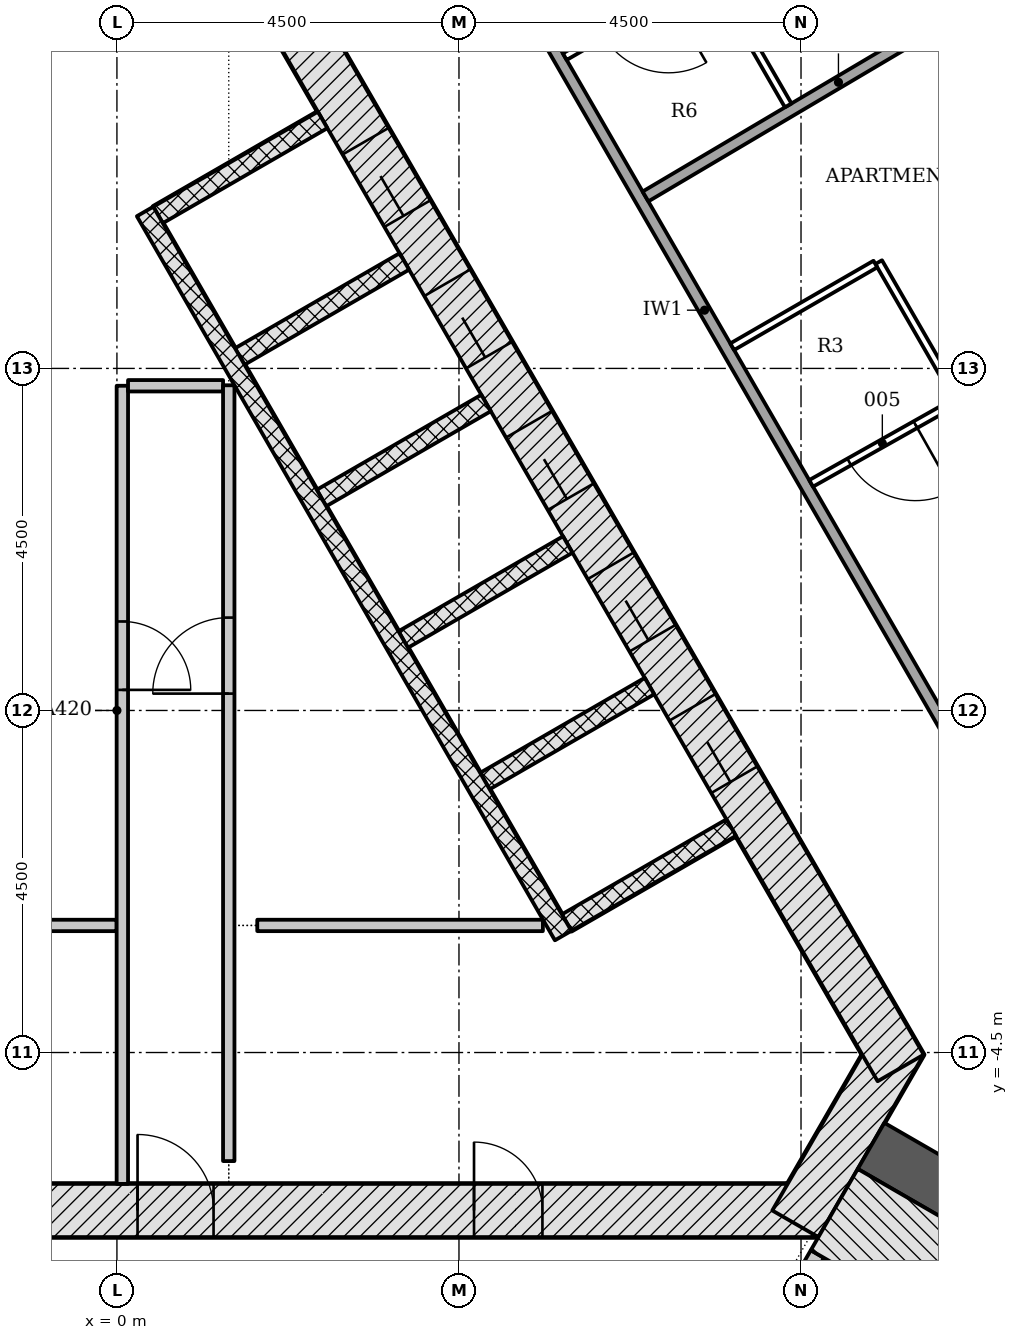
"""IFC4 building model, lengths in metres.
Left out: names, types, materials, properties, quantities, classifications, styles, units other than length and angle.
Written with IfcOpenShell. Run it as: python <this file> out.ifc"""

import sys

from ifc_helpers import new_model, si_unit, direction, frame, frame_2d, origin, place, context, subcontext, project, spatial, rectangle, extrude, element, fill, save


model = new_model("IFC4")
c1 = context("Model", 3, precision=1e-05, world=origin(), true_north=direction((0.0, 1.0)))
c2 = subcontext(c1, "Body", "Model", "MODEL_VIEW")
j1 = project(units=[si_unit("LENGTHUNIT", "METRE"), si_unit("PLANEANGLEUNIT", "RADIAN")], contexts=[c1])
p1 = place(None, origin())
s1 = spatial("IfcSite", under=j1, at=p1, CompositionType="ELEMENT")
p2 = place(p1, origin())
s2 = spatial("IfcBuilding", under=s1, at=p2, CompositionType="ELEMENT")
p3 = place(p2, frame((0.0, 0.0, 188.7)))
s3 = spatial("IfcBuildingStorey", under=s2, at=p3, CompositionType="ELEMENT", Elevation=188.7)
p4 = place(p3, frame((-9.229, -6.578, -0.2), z_axis=(0.0, 0.0, 1.0), x_axis=(1.0, 0.0, 0.0)))
e1 = element("IfcWall", 1, at=p4, inside=s3, PredefinedType="SHEAR", context=c2, shape_type="SweptSolid", body=[
    extrude(rectangle(XDim=18.458, YDim=0.7, at=frame_2d((9.229, 0.0))), origin(), (0.0, 0.0, 1.0), 3.6),
])
p5 = place(p4, frame((9.5, 0.0, 0.2)))
e2 = element("IfcOpeningElement", 2, at=p5, cuts=e1, PredefinedType="OPENING", context=c2, shape_type="SweptSolid", body=[
    extrude(rectangle(XDim=1.0, YDim=2.1, at=frame_2d((0.5, 1.05))), frame((0.0, 0.36, 0.0), z_axis=(0.0, -1.0, 0.0), x_axis=(1.0, 0.0, 0.0)), (0.0, 0.0, 1.0), 0.72),
])
p6 = place(p4, frame((4.402, 0.0, 0.2)))
e3 = element("IfcOpeningElement", 3, at=p6, cuts=e1, PredefinedType="OPENING", context=c2, shape_type="SweptSolid", body=[
    extrude(rectangle(XDim=0.9, YDim=2.1, at=frame_2d((0.45, 1.05))), frame((0.0, 0.36, 0.0), z_axis=(0.0, -1.0, 0.0), x_axis=(1.0, 0.0, 0.0)), (0.0, 0.0, 1.0), 0.72),
])
p7 = place(p4, frame((13.927, 0.0, 0.2)))
e4 = element("IfcOpeningElement", 4, at=p7, cuts=e1, PredefinedType="OPENING", context=c2, shape_type="SweptSolid", body=[
    extrude(rectangle(XDim=0.9, YDim=2.1, at=frame_2d((0.45, 1.05))), frame((0.0, 0.36, 0.0), z_axis=(0.0, -1.0, 0.0), x_axis=(1.0, 0.0, 0.0)), (0.0, 0.0, 1.0), 0.72),
])
p8 = place(p3, frame((8.926, -6.753, -0.2), z_axis=(0.0, 0.0, 1.0), x_axis=(0.500042739161, 0.866000726912, 0.0)))
e5 = element("IfcWall", 5, at=p8, inside=s3, PredefinedType="SHEAR", context=c2, shape_type="SweptSolid", body=[
    extrude(rectangle(XDim=2.771, YDim=0.7, at=frame_2d((1.386, 0.0))), origin(), (0.0, 0.0, 1.0), 3.6),
])
p9 = place(p3, frame((10.311, -4.703, -0.2), z_axis=(0.0, 0.0, 1.0), x_axis=(-0.500001446645, 0.866024568562, 0.0)))
e6 = element("IfcWall", 6, at=p9, inside=s3, PredefinedType="SHEAR", context=c2, shape_type="SweptSolid", body=[
    extrude(rectangle(XDim=18.458, YDim=0.7, at=frame_2d((9.229, 0.0))), origin(), (0.0, 0.0, 1.0), 3.6),
])
p10 = place(p9, frame((4.379, 0.0, 0.2)))
e7 = element("IfcOpeningElement", 7, at=p10, cuts=e6, PredefinedType="OPENING", context=c2, shape_type="SweptSolid", body=[
    extrude(rectangle(XDim=1.1, YDim=2.1, at=frame_2d((0.55, 1.05))), frame((0.0, 0.36, 0.0), z_axis=(0.0, -1.0, 0.0), x_axis=(1.0, 0.0, 0.0)), (0.0, 0.0, 1.0), 0.72),
])
p11 = place(p9, frame((6.529, 0.0, 0.2)))
e8 = element("IfcOpeningElement", 8, at=p11, cuts=e6, PredefinedType="OPENING", context=c2, shape_type="SweptSolid", body=[
    extrude(rectangle(XDim=1.1, YDim=2.1, at=frame_2d((0.55, 1.05))), frame((0.0, 0.36, 0.0), z_axis=(0.0, -1.0, 0.0), x_axis=(1.0, 0.0, 0.0)), (0.0, 0.0, 1.0), 0.72),
])
p12 = place(p9, frame((8.679, 0.0, 0.2)))
e9 = element("IfcOpeningElement", 9, at=p12, cuts=e6, PredefinedType="OPENING", context=c2, shape_type="SweptSolid", body=[
    extrude(rectangle(XDim=1.1, YDim=2.1, at=frame_2d((0.55, 1.05))), frame((0.0, 0.36, 0.0), z_axis=(0.0, -1.0, 0.0), x_axis=(1.0, 0.0, 0.0)), (0.0, 0.0, 1.0), 0.72),
])
p13 = place(p9, frame((10.829, 0.0, 0.2)))
e10 = element("IfcOpeningElement", 10, at=p13, cuts=e6, PredefinedType="OPENING", context=c2, shape_type="SweptSolid", body=[
    extrude(rectangle(XDim=1.1, YDim=2.1, at=frame_2d((0.55, 1.05))), frame((0.0, 0.36, 0.0), z_axis=(0.0, -1.0, 0.0), x_axis=(1.0, 0.0, 0.0)), (0.0, 0.0, 1.0), 0.72),
])
p14 = place(p9, frame((12.979, 0.0, 0.2)))
e11 = element("IfcOpeningElement", 11, at=p14, cuts=e6, PredefinedType="OPENING", context=c2, shape_type="SweptSolid", body=[
    extrude(rectangle(XDim=1.1, YDim=2.1, at=frame_2d((0.55, 1.05))), frame((0.0, 0.36, 0.0), z_axis=(0.0, -1.0, 0.0), x_axis=(1.0, 0.0, 0.0)), (0.0, 0.0, 1.0), 0.72),
])
p15 = place(p3, frame((-1.083, 11.281, -0.2), z_axis=(0.0, 0.0, 1.0), x_axis=(-0.500001446645, -0.866024568562, 0.0)))
e12 = element("IfcWall", 12, at=p15, inside=s3, PredefinedType="SHEAR", context=c2, shape_type="SweptSolid", body=[
    extrude(rectangle(XDim=18.458, YDim=0.7, at=frame_2d((9.229, 0.0))), origin(), (0.0, 0.0, 1.0), 3.6),
])
p16 = place(p15, frame((8.979, 0.0, 0.2)))
e13 = element("IfcOpeningElement", 13, at=p16, cuts=e12, PredefinedType="OPENING", context=c2, shape_type="SweptSolid", body=[
    extrude(rectangle(XDim=1.2, YDim=2.1, at=frame_2d((0.6, 1.05))), frame((0.0, 0.36, 0.0), z_axis=(0.0, -1.0, 0.0), x_axis=(1.0, 0.0, 0.0)), (0.0, 0.0, 1.0), 0.72),
])
p17 = place(p15, frame((11.029, 0.0, 0.2)))
e14 = element("IfcOpeningElement", 14, at=p17, cuts=e12, PredefinedType="OPENING", context=c2, shape_type="SweptSolid", body=[
    extrude(rectangle(XDim=1.2, YDim=2.1, at=frame_2d((0.6, 1.05))), frame((0.0, 0.36, 0.0), z_axis=(0.0, -1.0, 0.0), x_axis=(1.0, 0.0, 0.0)), (0.0, 0.0, 1.0), 0.72),
])
p18 = place(p3, frame((9.922, -5.728, -0.2), z_axis=(0.0, 0.0, 1.0), x_axis=(0.866025463095, -0.499999897272, 0.0)))
e15 = element("IfcWall", 15, at=p18, inside=s3, PredefinedType="SHEAR", context=c2, shape_type="SweptSolid", body=[
    extrude(rectangle(XDim=9.521, YDim=0.7, at=frame_2d((4.761, 0.0))), origin(), (0.0, 0.0, 1.0), 3.6),
])
for number, where, z_axis, x_axis in (
    (16, (8.081, -1.541, -0.2), (0.0, 0.0, 1.0), (-0.866, -0.5, 0.0)),
    (17, (7.006, 0.321, -0.2), (0.0, 0.0, 1.0), (-0.866, -0.5, 0.0)),
):
    element("IfcWall", number, at=place(p3, frame(where, z_axis=z_axis, x_axis=x_axis)), inside=s3, PredefinedType="PARTITIONING", context=c2, shape_type="SweptSolid", body=[
        extrude(rectangle(XDim=2.5, YDim=0.25, at=frame_2d((1.25, 0.0))), origin(), (0.0, 0.0, 1.0), 3.6),
    ])
p19 = place(p3, frame((5.931, 2.183, -0.2), z_axis=(0.0, 0.0, 1.0), x_axis=(-0.866047370643, -0.499961950354, 0.0)))
e18 = element("IfcWall", 18, at=p19, inside=s3, PredefinedType="PARTITIONING", context=c2, shape_type="SweptSolid", body=[
    extrude(rectangle(XDim=2.5, YDim=0.25, at=frame_2d((1.25, 0.0))), origin(), (0.0, 0.0, 1.0), 3.6),
])
for number, where, z_axis, x_axis in (
    (19, (4.856, 4.045, -0.2), (0.0, 0.0, 1.0), (-0.866, -0.5, 0.0)),
    (20, (3.781, 5.907, -0.2), (0.0, 0.0, 1.0), (-0.866, -0.5, 0.0)),
    (21, (2.706, 7.769, -0.2), (0.0, 0.0, 1.0), (-0.866, -0.5, 0.0)),
):
    element("IfcWall", number, at=place(p3, frame(where, z_axis=z_axis, x_axis=x_axis)), inside=s3, PredefinedType="PARTITIONING", context=c2, shape_type="SweptSolid", body=[
        extrude(rectangle(XDim=2.5, YDim=0.25, at=frame_2d((1.25, 0.0))), origin(), (0.0, 0.0, 1.0), 3.6),
    ])
p20 = place(p3, frame((5.87, -2.961, 0.0), z_axis=(0.0, 0.0, 1.0), x_axis=(-0.50000615651, 0.866021849293, 0.0)))
e22 = element("IfcWall", 22, at=p20, inside=s3, PredefinedType="PARTITIONING", context=c2, shape_type="SweptSolid", body=[
    extrude(rectangle(XDim=11.0, YDim=0.25, at=frame_2d((5.5, 0.0))), origin(), (0.0, 0.0, 1.0), 3.4),
])
p21 = place(p3, frame((-5.142, -2.828, 0.0), z_axis=(0.0, 0.0, 1.0), x_axis=(1.0, 0.0, 0.0)))
e23 = element("IfcWall", 23, at=p21, inside=s3, PredefinedType="PARTITIONING", context=c2, shape_type="SweptSolid", body=[
    extrude(rectangle(XDim=5.139, YDim=0.15, at=frame_2d((2.569, 0.0))), origin(), (0.0, 0.0, 1.0), 3.4),
])
p22 = place(p3, frame((0.071, 4.272, 0.0), z_axis=(0.0, 0.0, 1.0), x_axis=(0.0, -1.0, 0.0)))
e24 = element("IfcWall", 24, at=p22, inside=s3, PredefinedType="PARTITIONING", context=c2, shape_type="SweptSolid", body=[
    extrude(rectangle(XDim=10.5, YDim=0.15, at=frame_2d((5.25, 0.0))), origin(), (0.0, 0.0, 1.0), 3.4),
])
p23 = place(p22, frame((3.101, 0.0, 0.0)))
e25 = element("IfcOpeningElement", 25, at=p23, cuts=e24, PredefinedType="OPENING", context=c2, shape_type="SweptSolid", body=[
    extrude(rectangle(XDim=0.9, YDim=2.1, at=frame_2d((0.45, 1.05))), frame((0.0, 0.085, 0.0), z_axis=(0.0, -1.0, 0.0), x_axis=(1.0, 0.0, 0.0)), (0.0, 0.0, 1.0), 0.17),
])
p24 = place(p3, frame((0.146, 4.272, 0.0), z_axis=(0.0, 0.0, 1.0), x_axis=(1.0, 0.0, 0.0)))
e26 = element("IfcWall", 26, at=p24, inside=s3, PredefinedType="PARTITIONING", context=c2, shape_type="SweptSolid", body=[
    extrude(rectangle(XDim=1.25, YDim=0.15, at=frame_2d((0.625, 0.0))), origin(), (0.0, 0.0, 1.0), 3.4),
])
p25 = place(p3, frame((1.471, -5.928, 0.0), z_axis=(0.0, 0.0, 1.0), x_axis=(0.0, 1.0, 0.0)))
e27 = element("IfcWall", 27, at=p25, inside=s3, PredefinedType="PARTITIONING", context=c2, shape_type="SweptSolid", body=[
    extrude(rectangle(XDim=10.206, YDim=0.15, at=frame_2d((5.103, 0.0))), origin(), (0.0, 0.0, 1.0), 3.4),
])
p26 = place(p25, frame((6.15, 0.0, 0.0)))
e28 = element("IfcOpeningElement", 28, at=p26, cuts=e27, PredefinedType="OPENING", context=c2, shape_type="SweptSolid", body=[
    extrude(rectangle(XDim=1.0, YDim=2.1, at=frame_2d((0.5, 1.05))), frame((0.0, 0.085, 0.0), z_axis=(0.0, -1.0, 0.0), x_axis=(1.0, 0.0, 0.0)), (0.0, 0.0, 1.0), 0.17),
])
p27 = place(p3, frame((1.846, -2.828, 0.0), z_axis=(0.0, 0.0, 1.0), x_axis=(1.0, 0.0, 0.0)))
e29 = element("IfcWall", 29, at=p27, inside=s3, PredefinedType="PARTITIONING", context=c2, shape_type="SweptSolid", body=[
    extrude(rectangle(XDim=3.758, YDim=0.15, at=frame_2d((1.879, 0.0))), origin(), (0.0, 0.0, 1.0), 3.4),
])
p28 = place(p3, frame((7.44, -10.226, -0.2), z_axis=(0.0, 0.0, 1.0), x_axis=(0.500022077904, 0.866012656725, 0.0)))
e30 = element("IfcWall", 30, at=p28, inside=s3, PredefinedType="SHEAR", context=c2, shape_type="SweptSolid", body=[
    extrude(rectangle(XDim=3.55, YDim=0.2, at=frame_2d((1.775, 0.0))), origin(), (0.0, 0.0, 1.0), 3.6),
])
p29 = place(p28, frame((1.175, 0.0, 0.2)))
e31 = element("IfcOpeningElement", 31, at=p29, cuts=e30, PredefinedType="OPENING", context=c2, shape_type="SweptSolid", body=[
    extrude(rectangle(XDim=1.2, YDim=2.1, at=frame_2d((0.6, 1.05))), frame((0.0, 0.11, 0.0), z_axis=(0.0, -1.0, 0.0), x_axis=(1.0, 0.0, 0.0)), (0.0, 0.0, 1.0), 0.22),
])
p30 = place(p3, frame((9.438, -6.566, -0.2), z_axis=(0.0, 0.0, 1.0), x_axis=(0.866026919366, -0.499997374926, 0.0)))
e32 = element("IfcWall", 32, at=p30, inside=s3, PredefinedType="SHEAR", context=c2, shape_type="SweptSolid", body=[
    extrude(rectangle(XDim=7.2, YDim=1.236, at=frame_2d((3.6, 0.0))), origin(), (0.0, 0.0, 1.0), 3.6),
])
p31 = place(p3, frame((11.247, -0.824, 0.0), z_axis=(0.0, 0.0, 1.0), x_axis=(-0.499997921847, 0.866026603603, 0.0)))
e33 = element("IfcWall", 33, at=p31, inside=s3, PredefinedType="PARTITIONING", context=c2, shape_type="SweptSolid", body=[
    extrude(rectangle(XDim=14.065, YDim=0.15, at=frame_2d((7.032, 0.0))), origin(), (0.0, 0.0, 1.0), 2.852),
])
p32 = place(p31, frame((11.953, 0.0, 0.0)))
e34 = element("IfcOpeningElement", 34, at=p32, cuts=e33, PredefinedType="OPENING", context=c2, shape_type="SweptSolid", body=[
    extrude(rectangle(XDim=1.0, YDim=2.1, at=frame_2d((0.5, 1.05))), frame((0.0, 0.085, 0.0), z_axis=(0.0, -1.0, 0.0), x_axis=(1.0, 0.0, 0.0)), (0.0, 0.0, 1.0), 0.17),
])
p33 = place(p3, frame((14.277, 5.885, 0.0), z_axis=(0.0, 0.0, 1.0), x_axis=(-0.871335785584, -0.490687220907, 0.0)))
e35 = element("IfcWall", 35, at=p33, inside=s3, PredefinedType="PARTITIONING", context=c2, shape_type="SweptSolid", body=[
    extrude(rectangle(XDim=5.904, YDim=0.1, at=frame_2d((2.952, 0.0))), origin(), (0.0, 0.0, 1.0), 2.461),
])
p34 = place(p33, frame((1.339, 0.0, 0.0)))
e36 = element("IfcOpeningElement", 36, at=p34, cuts=e35, PredefinedType="OPENING", context=c2, shape_type="SweptSolid", body=[
    extrude(rectangle(XDim=1.0, YDim=2.1, at=frame_2d((0.5, 1.05))), frame((0.0, 0.06, 0.0), z_axis=(0.0, -1.0, 0.0), x_axis=(1.0, 0.0, 0.0)), (0.0, 0.0, 1.0), 0.12),
])
p35 = place(p33, frame((4.329, 0.0, 0.0)))
e37 = element("IfcOpeningElement", 37, at=p35, cuts=e35, PredefinedType="OPENING", context=c2, shape_type="SweptSolid", body=[
    extrude(rectangle(XDim=1.0, YDim=2.1, at=frame_2d((0.5, 1.05))), frame((0.0, 0.06, 0.0), z_axis=(0.0, -1.0, 0.0), x_axis=(1.0, 0.0, 0.0)), (0.0, 0.0, 1.0), 0.12),
])
p36 = place(p3, frame((11.047, 4.123, 0.0), z_axis=(0.0, 0.0, 1.0), x_axis=(-0.500007699544, 0.866020958405, 0.0)))
e38 = element("IfcWall", 38, at=p36, inside=s3, PredefinedType="PARTITIONING", context=c2, shape_type="SweptSolid", body=[
    extrude(rectangle(XDim=2.05, YDim=0.1, at=frame_2d((1.025, 0.0))), origin(), (0.0, 0.0, 1.0), 2.852),
])
p37 = place(p3, frame((9.979, 5.873, 0.0), z_axis=(0.0, 0.0, 1.0), x_axis=(-0.866037911478, -0.499978335414, 0.0)))
e39 = element("IfcWall", 39, at=p37, inside=s3, PredefinedType="PARTITIONING", context=c2, shape_type="SweptSolid", body=[
    extrude(rectangle(XDim=2.175, YDim=0.1, at=frame_2d((1.087, 0.0))), origin(), (0.0, 0.0, 1.0), 2.852),
])
p38 = place(p3, frame((12.031, 9.766, 0.0), z_axis=(0.0, 0.0, 1.0), x_axis=(-0.860638865546, -0.509215811922, 0.0)))
e40 = element("IfcWall", 40, at=p38, inside=s3, PredefinedType="PARTITIONING", context=c2, shape_type="SweptSolid", body=[
    extrude(rectangle(XDim=5.9, YDim=0.15, at=frame_2d((2.95, 0.0))), origin(), (0.0, 0.0, 1.0), 2.461),
])
p39 = place(p3, frame((8.831, 7.96, 0.0), z_axis=(0.0, 0.0, 1.0), x_axis=(-0.499990325971, 0.866030989016, 0.0)))
e41 = element("IfcWall", 41, at=p39, inside=s3, PredefinedType="PARTITIONING", context=c2, shape_type="SweptSolid", body=[
    extrude(rectangle(XDim=2.025, YDim=0.1, at=frame_2d((1.012, 0.0))), origin(), (0.0, 0.0, 1.0), 2.852),
])
p40 = place(p3, frame((7.775, 9.689, 0.0), z_axis=(0.0, 0.0, 1.0), x_axis=(-0.865989304205, -0.500062521093, 0.0)))
e42 = element("IfcWall", 42, at=p40, inside=s3, PredefinedType="PARTITIONING", context=c2, shape_type="SweptSolid", body=[
    extrude(rectangle(XDim=2.175, YDim=0.1, at=frame_2d((1.087, 0.0))), origin(), (0.0, 0.0, 1.0), 2.852),
])
p41 = place(p40, frame((0.6, 0.0, 0.0)))
e43 = element("IfcOpeningElement", 43, at=p41, cuts=e42, PredefinedType="OPENING", context=c2, shape_type="SweptSolid", body=[
    extrude(rectangle(XDim=1.0, YDim=2.1, at=frame_2d((0.5, 1.05))), frame((0.0, 0.06, 0.0), z_axis=(0.0, -1.0, 0.0), x_axis=(1.0, 0.0, 0.0)), (0.0, 0.0, 1.0), 0.12),
])
p42 = place(p3, frame((-0.35, 18.85, 0.0), z_axis=(0.0, 0.0, 1.0), x_axis=(-0.500005388685, -0.866022292603, 0.0)))
e44 = element("IfcWall", 44, at=p42, inside=s3, PredefinedType="PARTITIONING", context=c2, shape_type="SweptSolid", body=[
    extrude(rectangle(XDim=14.167, YDim=0.15, at=frame_2d((7.083, 0.0))), origin(), (0.0, 0.0, 1.0), 2.852),
])
p43 = place(p10, origin())
e45 = element("IfcDoor", 45, at=p43, inside=s3, OperationType="DOUBLE_DOOR_SLIDING", PredefinedType="DOOR", context=c2, shape_type="SweptSolid", body=[
    extrude(rectangle(XDim=1.1, YDim=2.1, at=frame_2d((0.55, 1.05))), frame((0.0, 0.025, 0.0), z_axis=(0.0, -1.0, 0.0), x_axis=(1.0, 0.0, 0.0)), (0.0, 0.0, 1.0), 0.05),
])
fill(e7, e45)
p44 = place(p11, origin())
e46 = element("IfcDoor", 46, at=p44, inside=s3, OperationType="DOUBLE_DOOR_SLIDING", PredefinedType="DOOR", context=c2, shape_type="SweptSolid", body=[
    extrude(rectangle(XDim=1.1, YDim=2.1, at=frame_2d((0.55, 1.05))), frame((0.0, 0.025, 0.0), z_axis=(0.0, -1.0, 0.0), x_axis=(1.0, 0.0, 0.0)), (0.0, 0.0, 1.0), 0.05),
])
fill(e8, e46)
p45 = place(p12, origin())
e47 = element("IfcDoor", 47, at=p45, inside=s3, OperationType="DOUBLE_DOOR_SLIDING", PredefinedType="DOOR", context=c2, shape_type="SweptSolid", body=[
    extrude(rectangle(XDim=1.1, YDim=2.1, at=frame_2d((0.55, 1.05))), frame((0.0, 0.025, 0.0), z_axis=(0.0, -1.0, 0.0), x_axis=(1.0, 0.0, 0.0)), (0.0, 0.0, 1.0), 0.05),
])
fill(e9, e47)
p46 = place(p13, origin())
e48 = element("IfcDoor", 48, at=p46, inside=s3, OperationType="DOUBLE_DOOR_SLIDING", PredefinedType="DOOR", context=c2, shape_type="SweptSolid", body=[
    extrude(rectangle(XDim=1.1, YDim=2.1, at=frame_2d((0.55, 1.05))), frame((0.0, 0.025, 0.0), z_axis=(0.0, -1.0, 0.0), x_axis=(1.0, 0.0, 0.0)), (0.0, 0.0, 1.0), 0.05),
])
fill(e10, e48)
p47 = place(p14, origin())
e49 = element("IfcDoor", 49, at=p47, inside=s3, OperationType="DOUBLE_DOOR_SLIDING", PredefinedType="DOOR", context=c2, shape_type="SweptSolid", body=[
    extrude(rectangle(XDim=1.1, YDim=2.1, at=frame_2d((0.55, 1.05))), frame((0.0, 0.025, 0.0), z_axis=(0.0, -1.0, 0.0), x_axis=(1.0, 0.0, 0.0)), (0.0, 0.0, 1.0), 0.05),
])
fill(e11, e49)
p48 = place(p5, origin())
e50 = element("IfcDoor", 50, at=p48, inside=s3, OperationType="SINGLE_SWING_LEFT", PredefinedType="DOOR", context=c2, shape_type="SweptSolid", body=[
    extrude(rectangle(XDim=1.0, YDim=2.1, at=frame_2d((0.5, 1.05))), frame((0.0, 0.075, 0.0), z_axis=(0.0, -1.0, 0.0), x_axis=(1.0, 0.0, 0.0)), (0.0, 0.0, 1.0), 0.15),
])
fill(e2, e50)
p49 = place(p7, origin())
e51 = element("IfcDoor", 51, at=p49, inside=s3, OperationType="SINGLE_SWING_LEFT", PredefinedType="DOOR", context=c2, shape_type="SweptSolid", body=[
    extrude(rectangle(XDim=0.9, YDim=2.1, at=frame_2d((0.45, 1.05))), frame((0.0, 0.075, 0.0), z_axis=(0.0, -1.0, 0.0), x_axis=(1.0, 0.0, 0.0)), (0.0, 0.0, 1.0), 0.15),
])
fill(e4, e51)
p50 = place(p23, origin())
e52 = element("IfcDoor", 52, at=p50, inside=s3, OperationType="SINGLE_SWING_RIGHT", PredefinedType="DOOR", context=c2, shape_type="SweptSolid", body=[
    extrude(rectangle(XDim=0.9, YDim=2.1, at=frame_2d((0.45, 1.05))), frame((0.0, 0.025, 0.0), z_axis=(0.0, -1.0, 0.0), x_axis=(1.0, 0.0, 0.0)), (0.0, 0.0, 1.0), 0.05),
])
fill(e25, e52)
p51 = place(p26, origin())
e53 = element("IfcDoor", 53, at=p51, inside=s3, OperationType="SINGLE_SWING_LEFT", PredefinedType="DOOR", context=c2, shape_type="SweptSolid", body=[
    extrude(rectangle(XDim=1.0, YDim=2.1, at=frame_2d((0.5, 1.05))), frame((0.0, 0.025, 0.0), z_axis=(0.0, -1.0, 0.0), x_axis=(1.0, 0.0, 0.0)), (0.0, 0.0, 1.0), 0.05),
])
fill(e28, e53)
p52 = place(p35, origin())
e54 = element("IfcDoor", 54, at=p52, inside=s3, OperationType="SINGLE_SWING_LEFT", PredefinedType="DOOR", context=c2, shape_type="SweptSolid", body=[
    extrude(rectangle(XDim=1.0, YDim=2.1, at=frame_2d((0.5, 1.05))), frame((0.0, 0.025, 0.0), z_axis=(0.0, -1.0, 0.0), x_axis=(1.0, 0.0, 0.0)), (0.0, 0.0, 1.0), 0.05),
])
fill(e37, e54)
save(model, sys.argv[1])
